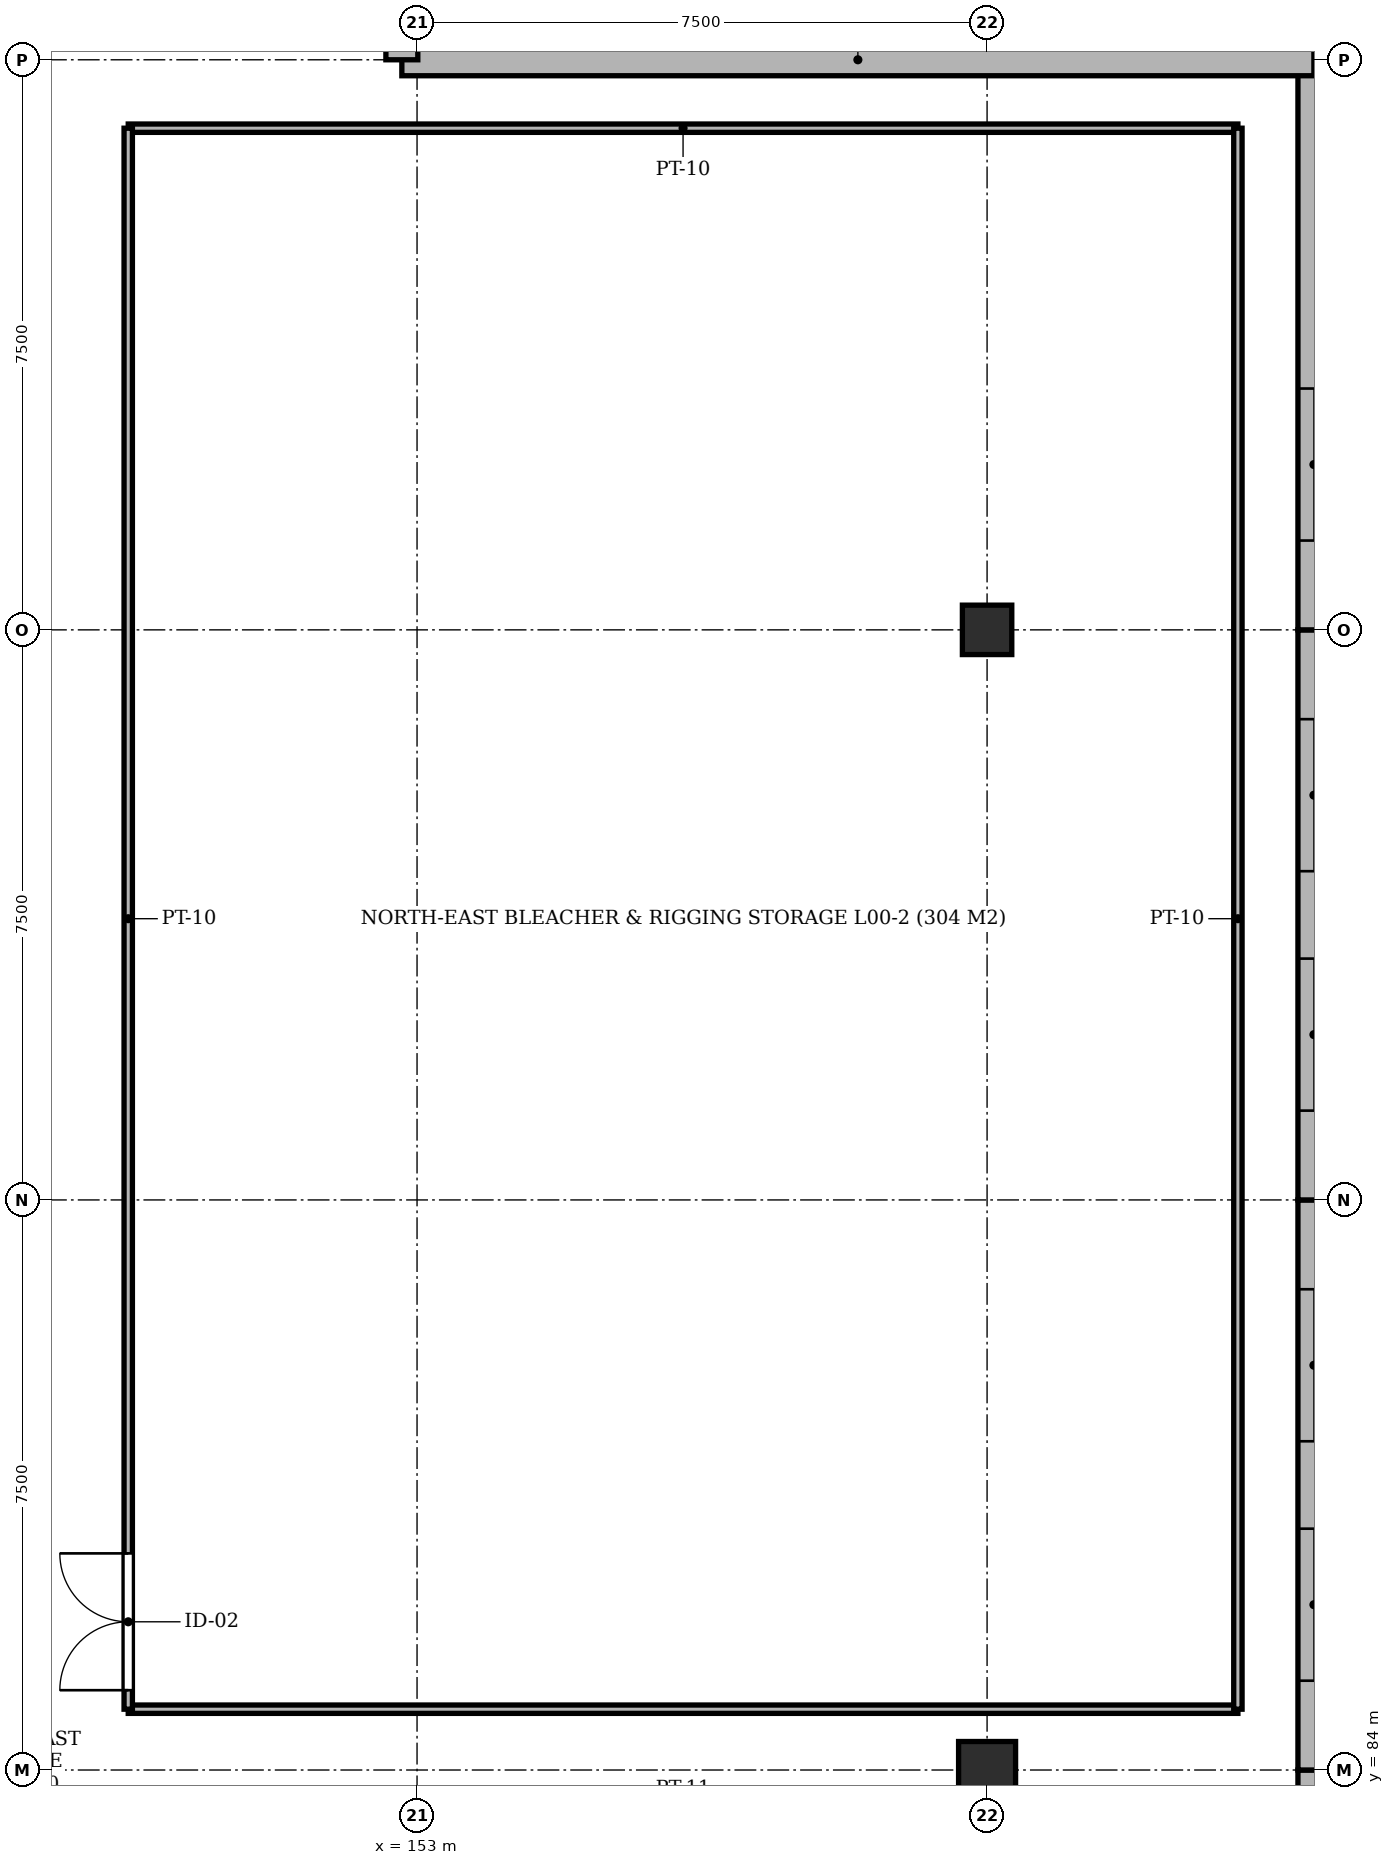
"""IFC4 building model, lengths in metres.
Left out: names, types, materials, properties, quantities, classifications, styles, units other than length and angle.
Written with IfcOpenShell. Run it as: python <this file> out.ifc"""

import sys

from ifc_helpers import new_model, si_unit, direction, frame, frame_2d, origin, origin_2d, place, context, subcontext, project, spatial, rectangle, extrude, element, fill, save


model = new_model("IFC4")
c1 = context("Model", 3, precision=1e-05, world=origin(), true_north=direction((0.0, 1.0)))
c2 = subcontext(c1, "Body", "Model", "MODEL_VIEW")
j1 = project(units=[si_unit("LENGTHUNIT", "METRE"), si_unit("PLANEANGLEUNIT", "RADIAN")], contexts=[c1])
p1 = place(None, origin())
s1 = spatial("IfcSite", under=j1, at=p1, CompositionType="ELEMENT")
p2 = place(p1, origin())
s2 = spatial("IfcBuilding", under=s1, at=p2, CompositionType="ELEMENT")
p3 = place(p2, origin())
s3 = spatial("IfcBuildingStorey", under=s2, at=p3, CompositionType="ELEMENT", Elevation=0.0)
p4 = place(p3, frame((160.5, 84.0, -0.35), z_axis=(0.0, 0.0, 1.0), x_axis=(1.0, 0.0, 0.0)))
e1 = element("IfcColumn", 1, at=p4, inside=s3, PredefinedType="COLUMN", context=c2, shape_type="SweptSolid", body=[
    extrude(rectangle(XDim=0.75, YDim=0.75, at=origin_2d()), origin(), (0.0, 0.0, 1.0), 4.65),
])
p5 = place(p3, frame((160.5, 99.0, -0.35), z_axis=(0.0, 0.0, 1.0), x_axis=(1.0, 0.0, 0.0)))
e2 = element("IfcColumn", 2, at=p5, inside=s3, PredefinedType="COLUMN", context=c2, shape_type="SweptSolid", body=[
    extrude(rectangle(XDim=0.65, YDim=0.65, at=origin_2d()), origin(), (0.0, 0.0, 1.0), 4.65),
])
p6 = place(p3, frame((164.8, 76.8, 0.0), z_axis=(0.0, 0.0, 1.0), x_axis=(0.0, 1.0, 0.0)))
e3 = element("IfcWall", 3, at=p6, inside=s3, PredefinedType="SOLIDWALL", context=c2, shape_type="SweptSolid", body=[
    extrude(rectangle(XDim=7.2, YDim=0.42, at=frame_2d((3.6, 0.0))), origin(), (0.0, 0.0, 1.0), 3.82),
])
p7 = place(p6, frame((1.088, 0.0, 0.92)))
e4 = element("IfcOpeningElement", 4, at=p7, cuts=e3, PredefinedType="OPENING", context=c2, shape_type="SweptSolid", body=[
    extrude(rectangle(XDim=2.0, YDim=1.89, at=frame_2d((1.0, 0.945))), frame((0.0, 0.222, 0.0), z_axis=(0.0, -1.0, 0.0), x_axis=(1.0, 0.0, 0.0)), (0.0, 0.0, 1.0), 0.444),
])
p8 = place(p3, frame((164.8, 84.0, 0.0), z_axis=(0.0, 0.0, 1.0), x_axis=(0.0, 1.0, 0.0)))
e5 = element("IfcWall", 5, at=p8, inside=s3, PredefinedType="SOLIDWALL", context=c2, shape_type="SweptSolid", body=[
    extrude(rectangle(XDim=7.5, YDim=0.42, at=frame_2d((3.75, 0.0))), origin(), (0.0, 0.0, 1.0), 3.82),
])
p9 = place(p8, frame((1.175, 0.0, 0.92)))
e6 = element("IfcOpeningElement", 6, at=p9, cuts=e5, PredefinedType="OPENING", context=c2, shape_type="SweptSolid", body=[
    extrude(rectangle(XDim=2.0, YDim=1.89, at=frame_2d((1.0, 0.945))), frame((0.0, 0.222, 0.0), z_axis=(0.0, -1.0, 0.0), x_axis=(1.0, 0.0, 0.0)), (0.0, 0.0, 1.0), 0.444),
])
p10 = place(p8, frame((4.325, 0.0, 0.92)))
e7 = element("IfcOpeningElement", 7, at=p10, cuts=e5, PredefinedType="OPENING", context=c2, shape_type="SweptSolid", body=[
    extrude(rectangle(XDim=2.0, YDim=1.89, at=frame_2d((1.0, 0.945))), frame((0.0, 0.222, 0.0), z_axis=(0.0, -1.0, 0.0), x_axis=(1.0, 0.0, 0.0)), (0.0, 0.0, 1.0), 0.444),
])
p11 = place(p3, frame((164.8, 91.5, 0.0), z_axis=(0.0, 0.0, 1.0), x_axis=(0.0, 1.0, 0.0)))
e8 = element("IfcWall", 8, at=p11, inside=s3, PredefinedType="SOLIDWALL", context=c2, shape_type="SweptSolid", body=[
    extrude(rectangle(XDim=7.5, YDim=0.42, at=frame_2d((3.75, 0.0))), origin(), (0.0, 0.0, 1.0), 3.82),
])
p12 = place(p11, frame((1.175, 0.0, 0.92)))
e9 = element("IfcOpeningElement", 9, at=p12, cuts=e8, PredefinedType="OPENING", context=c2, shape_type="SweptSolid", body=[
    extrude(rectangle(XDim=2.0, YDim=1.89, at=frame_2d((1.0, 0.945))), frame((0.0, 0.222, 0.0), z_axis=(0.0, -1.0, 0.0), x_axis=(1.0, 0.0, 0.0)), (0.0, 0.0, 1.0), 0.444),
])
p13 = place(p11, frame((4.325, 0.0, 0.92)))
e10 = element("IfcOpeningElement", 10, at=p13, cuts=e8, PredefinedType="OPENING", context=c2, shape_type="SweptSolid", body=[
    extrude(rectangle(XDim=2.0, YDim=1.89, at=frame_2d((1.0, 0.945))), frame((0.0, 0.222, 0.0), z_axis=(0.0, -1.0, 0.0), x_axis=(1.0, 0.0, 0.0)), (0.0, 0.0, 1.0), 0.444),
])
p14 = place(p3, frame((164.8, 99.0, 0.0), z_axis=(0.0, 0.0, 1.0), x_axis=(0.0, 1.0, 0.0)))
e11 = element("IfcWall", 11, at=p14, inside=s3, PredefinedType="SOLIDWALL", context=c2, shape_type="SweptSolid", body=[
    extrude(rectangle(XDim=7.5, YDim=0.42, at=frame_2d((3.75, 0.0))), origin(), (0.0, 0.0, 1.0), 3.82),
])
p15 = place(p14, frame((1.175, 0.0, 0.92)))
e12 = element("IfcOpeningElement", 12, at=p15, cuts=e11, PredefinedType="OPENING", context=c2, shape_type="SweptSolid", body=[
    extrude(rectangle(XDim=2.0, YDim=1.89, at=frame_2d((1.0, 0.945))), frame((0.0, 0.222, 0.0), z_axis=(0.0, -1.0, 0.0), x_axis=(1.0, 0.0, 0.0)), (0.0, 0.0, 1.0), 0.444),
])
p16 = place(p3, frame((164.8, 106.5, 0.0), z_axis=(0.0, 0.0, 1.0), x_axis=(-1.0, 0.0, 0.0)))
e13 = element("IfcWall", 13, at=p16, inside=s3, PredefinedType="SOLIDWALL", context=c2, shape_type="SweptSolid", body=[
    extrude(rectangle(XDim=12.0, YDim=0.42, at=frame_2d((6.0, 0.0))), origin(), (0.0, 0.0, 1.0), 3.82),
])
p17 = place(p3, frame((152.8, 106.5, 0.0), z_axis=(0.0, 0.0, 1.0), x_axis=(0.0, 1.0, 0.0)))
e14 = element("IfcWall", 14, at=p17, inside=s3, PredefinedType="SOLIDWALL", context=c2, shape_type="SweptSolid", body=[
    extrude(rectangle(XDim=7.29, YDim=0.42, at=frame_2d((3.645, 0.0))), origin(), (0.0, 0.0, 1.0), 3.82),
])
p18 = place(p17, frame((0.95, 0.0, 0.0)))
e15 = element("IfcOpeningElement", 15, at=p18, cuts=e14, PredefinedType="OPENING", context=c2, shape_type="SweptSolid", body=[
    extrude(rectangle(XDim=5.2, YDim=3.2, at=frame_2d((2.6, 1.6))), frame((0.0, 0.222, 0.0), z_axis=(0.0, -1.0, 0.0), x_axis=(1.0, 0.0, 0.0)), (0.0, 0.0, 1.0), 0.444),
])
for number, where, z_axis, x_axis in (
    (16, (149.2, 84.8, 0.0), (0.0, 0.0, 1.0), (1.0, 0.0, 0.0)),
    (17, (149.2, 105.6, 0.0), (0.0, 0.0, 1.0), (1.0, 0.0, 0.0)),
):
    element("IfcWall", number, at=place(p3, frame(where, z_axis=z_axis, x_axis=x_axis)), inside=s3, PredefinedType="PARTITIONING", context=c2, shape_type="SweptSolid", body=[
        extrude(rectangle(XDim=14.6, YDim=0.11, at=frame_2d((7.3, 0.0))), origin(), (0.0, 0.0, 1.0), 3.88),
    ])
p19 = place(p3, frame((149.2, 84.8, 0.0), z_axis=(0.0, 0.0, 1.0), x_axis=(0.0, 1.0, 0.0)))
e18 = element("IfcWall", 18, at=p19, inside=s3, PredefinedType="PARTITIONING", context=c2, shape_type="SweptSolid", body=[
    extrude(rectangle(XDim=20.8, YDim=0.11, at=frame_2d((10.4, 0.0))), origin(), (0.0, 0.0, 1.0), 3.88),
])
p20 = place(p19, frame((0.25, 0.0, 0.0)))
e19 = element("IfcOpeningElement", 19, at=p20, cuts=e18, PredefinedType="OPENING", context=c2, shape_type="SweptSolid", body=[
    extrude(rectangle(XDim=1.8, YDim=2.25, at=frame_2d((0.9, 1.125))), frame((0.0, 0.067, 0.0), z_axis=(0.0, -1.0, 0.0), x_axis=(1.0, 0.0, 0.0)), (0.0, 0.0, 1.0), 0.134),
])
p21 = place(p3, frame((163.8, 84.8, 0.0), z_axis=(0.0, 0.0, 1.0), x_axis=(0.0, 1.0, 0.0)))
e20 = element("IfcWall", 20, at=p21, inside=s3, PredefinedType="PARTITIONING", context=c2, shape_type="SweptSolid", body=[
    extrude(rectangle(XDim=20.8, YDim=0.11, at=frame_2d((10.4, 0.0))), origin(), (0.0, 0.0, 1.0), 3.88),
])
p22 = place(p9, origin())
e21 = element("IfcWindow", 21, at=p22, inside=s3, PartitioningType="SINGLE_PANEL", PredefinedType="WINDOW", context=c2, shape_type="SweptSolid", body=[
    extrude(rectangle(XDim=2.0, YDim=1.89, at=frame_2d((1.0, 0.945))), frame((0.0, 0.03, 0.0), z_axis=(0.0, -1.0, 0.0), x_axis=(1.0, 0.0, 0.0)), (0.0, 0.0, 1.0), 0.06),
])
fill(e6, e21)
p23 = place(p10, origin())
e22 = element("IfcWindow", 22, at=p23, inside=s3, PartitioningType="SINGLE_PANEL", PredefinedType="WINDOW", context=c2, shape_type="SweptSolid", body=[
    extrude(rectangle(XDim=2.0, YDim=1.89, at=frame_2d((1.0, 0.945))), frame((0.0, 0.03, 0.0), z_axis=(0.0, -1.0, 0.0), x_axis=(1.0, 0.0, 0.0)), (0.0, 0.0, 1.0), 0.06),
])
fill(e7, e22)
p24 = place(p12, origin())
e23 = element("IfcWindow", 23, at=p24, inside=s3, PartitioningType="SINGLE_PANEL", PredefinedType="WINDOW", context=c2, shape_type="SweptSolid", body=[
    extrude(rectangle(XDim=2.0, YDim=1.89, at=frame_2d((1.0, 0.945))), frame((0.0, 0.03, 0.0), z_axis=(0.0, -1.0, 0.0), x_axis=(1.0, 0.0, 0.0)), (0.0, 0.0, 1.0), 0.06),
])
fill(e9, e23)
p25 = place(p13, origin())
e24 = element("IfcWindow", 24, at=p25, inside=s3, PartitioningType="SINGLE_PANEL", PredefinedType="WINDOW", context=c2, shape_type="SweptSolid", body=[
    extrude(rectangle(XDim=2.0, YDim=1.89, at=frame_2d((1.0, 0.945))), frame((0.0, 0.03, 0.0), z_axis=(0.0, -1.0, 0.0), x_axis=(1.0, 0.0, 0.0)), (0.0, 0.0, 1.0), 0.06),
])
fill(e10, e24)
p26 = place(p15, origin())
e25 = element("IfcWindow", 25, at=p26, inside=s3, PartitioningType="SINGLE_PANEL", PredefinedType="WINDOW", context=c2, shape_type="SweptSolid", body=[
    extrude(rectangle(XDim=2.0, YDim=1.89, at=frame_2d((1.0, 0.945))), frame((0.0, 0.03, 0.0), z_axis=(0.0, -1.0, 0.0), x_axis=(1.0, 0.0, 0.0)), (0.0, 0.0, 1.0), 0.06),
])
fill(e12, e25)
p27 = place(p20, origin())
e26 = element("IfcDoor", 26, at=p27, inside=s3, OperationType="DOUBLE_DOOR_SINGLE_SWING", PredefinedType="DOOR", context=c2, shape_type="SweptSolid", body=[
    extrude(rectangle(XDim=1.8, YDim=2.25, at=frame_2d((0.9, 1.125))), frame((0.0, 0.025, 0.0), z_axis=(0.0, -1.0, 0.0), x_axis=(1.0, 0.0, 0.0)), (0.0, 0.0, 1.0), 0.05),
])
fill(e19, e26)
save(model, sys.argv[1])
